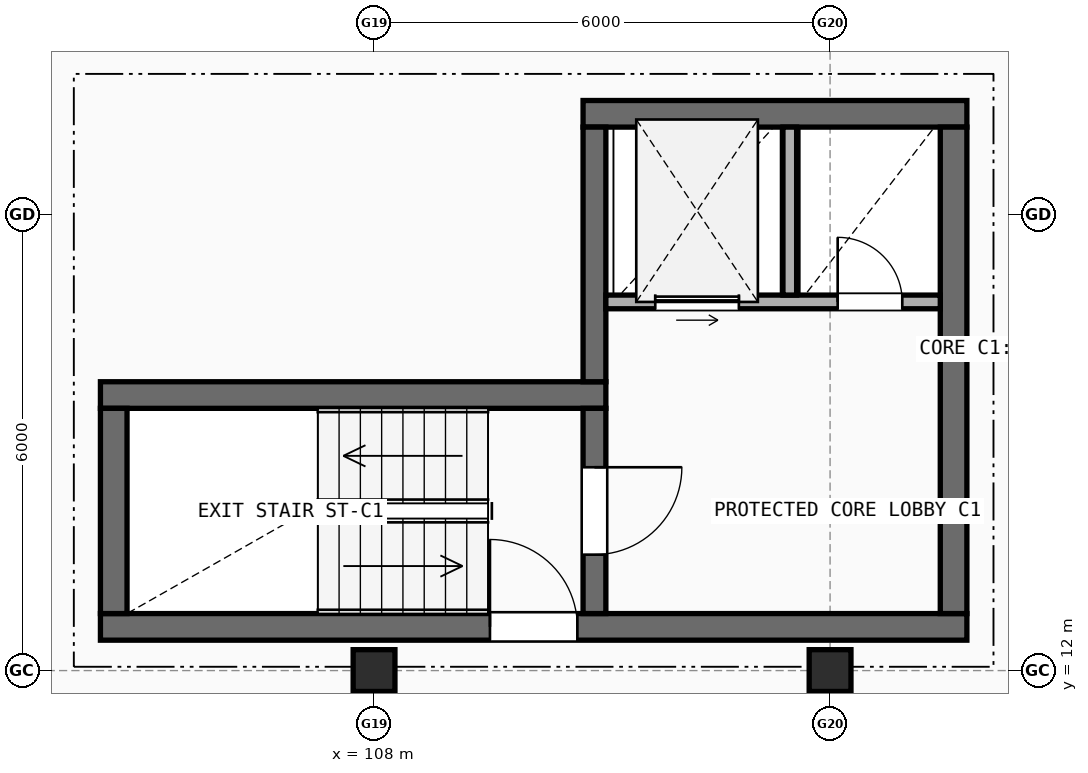
"""IFC4 building model, lengths in metres.
Left out: names, types, materials, properties, quantities, classifications, styles, units other than length and angle.
Written with IfcOpenShell. Run it as: python <this file> out.ifc"""

import sys

from ifc_helpers import new_model, si_unit, direction, frame, frame_2d, origin, origin_2d, place, context, subcontext, project, spatial, rectangle, extrude, element, fill, save


model = new_model("IFC4")
c1 = context("Model", 3, precision=1e-05, world=origin(), true_north=direction((0.0, 1.0)))
c2 = subcontext(c1, "Body", "Model", "MODEL_VIEW")
j1 = project(units=[si_unit("LENGTHUNIT", "METRE"), si_unit("PLANEANGLEUNIT", "RADIAN")], contexts=[c1])
p1 = place(None, origin())
s1 = spatial("IfcSite", under=j1, at=p1, CompositionType="ELEMENT")
p2 = place(p1, origin())
s2 = spatial("IfcBuilding", under=s1, at=p2, CompositionType="ELEMENT")
p3 = place(p2, frame((0.0, 0.0, 17.3)))
s3 = spatial("IfcBuildingStorey", under=s2, at=p3, CompositionType="ELEMENT", Elevation=17.3)
for number, where, z_axis, x_axis in (
    (1, (108.0, 12.0, 0.0), (0.0, 0.0, 1.0), (1.0, 0.0, 0.0)),
    (2, (114.0, 12.0, 0.0), (0.0, 0.0, 1.0), (1.0, 0.0, 0.0)),
):
    element("IfcColumn", number, at=place(p3, frame(where, z_axis=z_axis, x_axis=x_axis)), inside=s3, PredefinedType="COLUMN", context=c2, shape_type="SweptSolid", body=[
        extrude(rectangle(XDim=0.55, YDim=0.55, at=origin_2d()), origin(), (0.0, 0.0, 1.0), 2.965),
    ])
p4 = place(p3, frame((104.4, 12.575, 0.0), z_axis=(0.0, 0.0, 1.0), x_axis=(1.0, 0.0, 0.0)))
e3 = element("IfcWall", 3, at=p4, inside=s3, PredefinedType="SHEAR", context=c2, shape_type="SweptSolid", body=[
    extrude(rectangle(XDim=11.4, YDim=0.35, at=frame_2d((5.7, 0.0))), origin(), (0.0, 0.0, 1.0), 2.965),
])
p5 = place(p4, frame((5.125, 0.0, 0.0)))
e4 = element("IfcOpeningElement", 4, at=p5, cuts=e3, PredefinedType="OPENING", context=c2, shape_type="SweptSolid", body=[
    extrude(rectangle(XDim=1.15, YDim=2.15, at=frame_2d((0.575, 1.075))), frame((0.0, 0.185, 0.0), z_axis=(0.0, -1.0, 0.0), x_axis=(1.0, 0.0, 0.0)), (0.0, 0.0, 1.0), 0.37),
])
p6 = place(p3, frame((111.05, 15.625, 0.0), z_axis=(0.0, 0.0, 1.0), x_axis=(-1.0, 0.0, 0.0)))
e5 = element("IfcWall", 5, at=p6, inside=s3, PredefinedType="SHEAR", context=c2, shape_type="SweptSolid", body=[
    extrude(rectangle(XDim=6.65, YDim=0.35, at=frame_2d((3.325, 0.0))), origin(), (0.0, 0.0, 1.0), 2.965),
])
p7 = place(p3, frame((104.575, 15.45, 0.0), z_axis=(0.0, 0.0, 1.0), x_axis=(0.0, -1.0, 0.0)))
e6 = element("IfcWall", 6, at=p7, inside=s3, PredefinedType="SHEAR", context=c2, shape_type="SweptSolid", body=[
    extrude(rectangle(XDim=2.7, YDim=0.35, at=frame_2d((1.35, 0.0))), origin(), (0.0, 0.0, 1.0), 2.965),
])
p8 = place(p3, frame((110.9, 12.75, 0.0), z_axis=(0.0, 0.0, 1.0), x_axis=(0.0, 1.0, 0.0)))
e7 = element("IfcWall", 7, at=p8, inside=s3, PredefinedType="SHEAR", context=c2, shape_type="SweptSolid", body=[
    extrude(rectangle(XDim=2.7, YDim=0.3, at=frame_2d((1.35, 0.0))), origin(), (0.0, 0.0, 1.0), 2.965),
])
p9 = place(p8, frame((0.775, 0.0, 0.0)))
e8 = element("IfcOpeningElement", 8, at=p9, cuts=e7, PredefinedType="OPENING", context=c2, shape_type="SweptSolid", body=[
    extrude(rectangle(XDim=1.15, YDim=2.15, at=frame_2d((0.575, 1.075))), frame((0.0, 0.16, 0.0), z_axis=(0.0, -1.0, 0.0), x_axis=(1.0, 0.0, 0.0)), (0.0, 0.0, 1.0), 0.32),
])
p10 = place(p3, frame((115.8, 19.325, 0.0), z_axis=(0.0, 0.0, 1.0), x_axis=(-1.0, 0.0, 0.0)))
e9 = element("IfcWall", 9, at=p10, inside=s3, PredefinedType="SHEAR", context=c2, shape_type="SweptSolid", body=[
    extrude(rectangle(XDim=5.05, YDim=0.35, at=frame_2d((2.525, 0.0))), origin(), (0.0, 0.0, 1.0), 2.965),
])
p11 = place(p3, frame((115.625, 12.75, 0.0), z_axis=(0.0, 0.0, 1.0), x_axis=(0.0, 1.0, 0.0)))
e10 = element("IfcWall", 10, at=p11, inside=s3, PredefinedType="SHEAR", context=c2, shape_type="SweptSolid", body=[
    extrude(rectangle(XDim=6.4, YDim=0.35, at=frame_2d((3.2, 0.0))), origin(), (0.0, 0.0, 1.0), 2.965),
])
p12 = place(p3, frame((110.9, 15.8, 0.0), z_axis=(0.0, 0.0, 1.0), x_axis=(0.0, 1.0, 0.0)))
e11 = element("IfcWall", 11, at=p12, inside=s3, PredefinedType="SHEAR", context=c2, shape_type="SweptSolid", body=[
    extrude(rectangle(XDim=3.35, YDim=0.3, at=frame_2d((1.675, 0.0))), origin(), (0.0, 0.0, 1.0), 2.965),
])
p13 = place(p3, frame((111.05, 16.85, 0.0), z_axis=(0.0, 0.0, 1.0), x_axis=(1.0, 0.0, 0.0)))
e12 = element("IfcWall", 12, at=p13, inside=s3, PredefinedType="SOLIDWALL", context=c2, shape_type="SweptSolid", body=[
    extrude(rectangle(XDim=4.4, YDim=0.18, at=frame_2d((2.2, 0.0))), origin(), (0.0, 0.0, 1.0), 2.965),
])
p14 = place(p13, frame((0.65, 0.0, 0.0)))
e13 = element("IfcOpeningElement", 13, at=p14, cuts=e12, PredefinedType="OPENING", context=c2, shape_type="SweptSolid", body=[
    extrude(rectangle(XDim=1.1, YDim=2.15, at=frame_2d((0.55, 1.075))), frame((0.0, 0.1, 0.0), z_axis=(0.0, -1.0, 0.0), x_axis=(1.0, 0.0, 0.0)), (0.0, 0.0, 1.0), 0.2),
])
p15 = place(p13, frame((3.05, 0.0, 0.0)))
e14 = element("IfcOpeningElement", 14, at=p15, cuts=e12, PredefinedType="OPENING", context=c2, shape_type="SweptSolid", body=[
    extrude(rectangle(XDim=0.85, YDim=2.1, at=frame_2d((0.425, 1.05))), frame((0.0, 0.1, 0.0), z_axis=(0.0, -1.0, 0.0), x_axis=(1.0, 0.0, 0.0)), (0.0, 0.0, 1.0), 0.2),
])
p16 = place(p3, frame((113.47, 16.94, 0.0), z_axis=(0.0, 0.0, 1.0), x_axis=(0.0, 1.0, 0.0)))
e15 = element("IfcWall", 15, at=p16, inside=s3, PredefinedType="SOLIDWALL", context=c2, shape_type="SweptSolid", body=[
    extrude(rectangle(XDim=2.21, YDim=0.18, at=frame_2d((1.105, 0.0))), origin(), (0.0, 0.0, 1.0), 2.965),
])
p17 = place(p5, origin())
e16 = element("IfcDoor", 16, at=p17, inside=s3, OperationType="SINGLE_SWING_LEFT", PredefinedType="DOOR", context=c2, shape_type="SweptSolid", body=[
    extrude(rectangle(XDim=1.15, YDim=2.15, at=frame_2d((0.575, 1.075))), frame((0.0, 0.025, 0.0), z_axis=(0.0, -1.0, 0.0), x_axis=(1.0, 0.0, 0.0)), (0.0, 0.0, 1.0), 0.05),
])
fill(e4, e16)
p18 = place(p9, origin())
e17 = element("IfcDoor", 17, at=p18, inside=s3, OperationType="SINGLE_SWING_RIGHT", PredefinedType="DOOR", context=c2, shape_type="SweptSolid", body=[
    extrude(rectangle(XDim=1.15, YDim=2.15, at=frame_2d((0.575, 1.075))), frame((0.0, 0.025, 0.0), z_axis=(0.0, -1.0, 0.0), x_axis=(1.0, 0.0, 0.0)), (0.0, 0.0, 1.0), 0.05),
])
fill(e8, e17)
p19 = place(p14, origin())
e18 = element("IfcDoor", 18, at=p19, inside=s3, OperationType="SLIDING_TO_LEFT", PredefinedType="DOOR", context=c2, shape_type="SweptSolid", body=[
    extrude(rectangle(XDim=1.1, YDim=2.15, at=frame_2d((0.55, 1.075))), frame((0.0, 0.025, 0.0), z_axis=(0.0, -1.0, 0.0), x_axis=(1.0, 0.0, 0.0)), (0.0, 0.0, 1.0), 0.05),
])
fill(e13, e18)
p20 = place(p15, frame((0.85, 0.0, 0.0), z_axis=(0.0, 0.0, 1.0), x_axis=(-1.0, 0.0, 0.0)))
e19 = element("IfcDoor", 19, at=p20, inside=s3, OperationType="SINGLE_SWING_LEFT", PredefinedType="DOOR", context=c2, shape_type="SweptSolid", body=[
    extrude(rectangle(XDim=0.85, YDim=2.1, at=frame_2d((0.425, 1.05))), frame((0.0, 0.025, 0.0), z_axis=(0.0, -1.0, 0.0), x_axis=(1.0, 0.0, 0.0)), (0.0, 0.0, 1.0), 0.05),
])
fill(e14, e19)
save(model, sys.argv[1])
